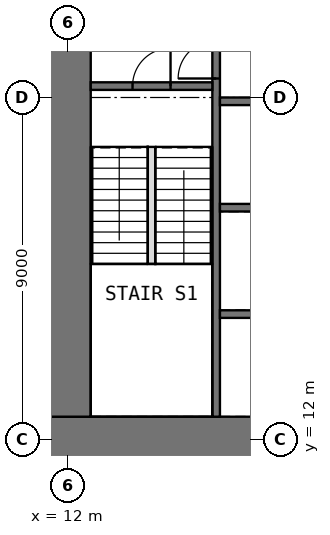
"""IFC4 building model, lengths in metres.
Left out: names, types, materials, properties, quantities, classifications, styles, units other than length and angle.
Written with IfcOpenShell. Run it as: python <this file> out.ifc"""

import sys

from ifc_helpers import new_model, si_unit, direction, frame, frame_2d, origin, place, context, subcontext, project, spatial, rectangle, extrude, element, fill, save


model = new_model("IFC4")
c1 = context("Model", 3, precision=1e-05, world=origin(), true_north=direction((0.0, 1.0)))
c2 = subcontext(c1, "Body", "Model", "MODEL_VIEW")
j1 = project(units=[si_unit("LENGTHUNIT", "METRE"), si_unit("PLANEANGLEUNIT", "RADIAN")], contexts=[c1])
p1 = place(None, origin())
s1 = spatial("IfcSite", under=j1, at=p1, CompositionType="ELEMENT")
p2 = place(p1, origin())
s2 = spatial("IfcBuilding", under=s1, at=p2, CompositionType="ELEMENT")
p3 = place(p2, frame((0.0, 0.0, 26.5)))
s3 = spatial("IfcBuildingStorey", under=s2, at=p3, CompositionType="ELEMENT", Elevation=26.5)
p4 = place(p3, frame((10.8, 11.7, -0.05), z_axis=(0.0, 0.0, 1.0), x_axis=(1.0, 0.0, 0.0)))
e1 = element("IfcWall", 1, at=p4, inside=s3, PredefinedType="SHEAR", context=c2, shape_type="SweptSolid", body=[
    extrude(rectangle(XDim=20.4, YDim=1.8, at=frame_2d((10.2, 0.0))), origin(), (0.0, 0.0, 1.0), 4.0),
])
p5 = place(p4, frame((9.2, 0.0, 0.05)))
e2 = element("IfcOpeningElement", 2, at=p5, cuts=e1, PredefinedType="OPENING", context=c2, shape_type="SweptSolid", body=[
    extrude(rectangle(XDim=2.0, YDim=2.2, at=frame_2d((1.0, 1.1))), frame((0.0, 0.91, 0.0), z_axis=(0.0, -1.0, 0.0), x_axis=(1.0, 0.0, 0.0)), (0.0, 0.0, 1.0), 1.82),
])
p6 = place(p3, frame((11.7, 12.6, -0.05), z_axis=(0.0, 0.0, 1.0), x_axis=(0.0, 1.0, 0.0)))
e3 = element("IfcWall", 3, at=p6, inside=s3, PredefinedType="SHEAR", context=c2, shape_type="SweptSolid", body=[
    extrude(rectangle(XDim=16.8, YDim=1.8, at=frame_2d((8.4, 0.0))), origin(), (0.0, 0.0, 1.0), 4.0),
])
p7 = place(p6, frame((9.9, 0.0, 0.05)))
e4 = element("IfcOpeningElement", 4, at=p7, cuts=e3, PredefinedType="OPENING", context=c2, shape_type="SweptSolid", body=[
    extrude(rectangle(XDim=1.0, YDim=2.2, at=frame_2d((0.5, 1.1))), frame((0.0, 0.91, 0.0), z_axis=(0.0, -1.0, 0.0), x_axis=(1.0, 0.0, 0.0)), (0.0, 0.0, 1.0), 1.82),
])
p8 = place(p3, frame((15.9, 12.6, -0.05), z_axis=(0.0, 0.0, 1.0), x_axis=(0.0, 1.0, 0.0)))
e5 = element("IfcWall", 5, at=p8, inside=s3, PredefinedType="SHEAR", context=c2, shape_type="SweptSolid", body=[
    extrude(rectangle(XDim=16.8, YDim=0.2, at=frame_2d((8.4, 0.0))), origin(), (0.0, 0.0, 1.0), 4.0),
])
p9 = place(p8, frame((8.9, 0.0, 0.05)))
e6 = element("IfcOpeningElement", 6, at=p9, cuts=e5, PredefinedType="OPENING", context=c2, shape_type="SweptSolid", body=[
    extrude(rectangle(XDim=1.0, YDim=2.2, at=frame_2d((0.5, 1.1))), frame((0.0, 0.11, 0.0), z_axis=(0.0, -1.0, 0.0), x_axis=(1.0, 0.0, 0.0)), (0.0, 0.0, 1.0), 0.22),
])
p10 = place(p3, frame((12.6, 21.3, -0.05), z_axis=(0.0, 0.0, 1.0), x_axis=(1.0, 0.0, 0.0)))
e7 = element("IfcWall", 7, at=p10, inside=s3, PredefinedType="SHEAR", context=c2, shape_type="SweptSolid", body=[
    extrude(rectangle(XDim=3.2, YDim=0.2, at=frame_2d((1.6, 0.0))), origin(), (0.0, 0.0, 1.0), 4.0),
])
p11 = place(p10, frame((1.1, 0.0, 0.05)))
e8 = element("IfcOpeningElement", 8, at=p11, cuts=e7, PredefinedType="OPENING", context=c2, shape_type="SweptSolid", body=[
    extrude(rectangle(XDim=1.0, YDim=2.2, at=frame_2d((0.5, 1.1))), frame((0.0, 0.11, 0.0), z_axis=(0.0, -1.0, 0.0), x_axis=(1.0, 0.0, 0.0)), (0.0, 0.0, 1.0), 0.22),
])
for number, where, z_axis, x_axis in (
    (9, (16.0, 15.3, -0.05), (0.0, 0.0, 1.0), (1.0, 0.0, 0.0)),
    (10, (16.0, 18.1, -0.05), (0.0, 0.0, 1.0), (1.0, 0.0, 0.0)),
    (11, (16.0, 20.9, -0.05), (0.0, 0.0, 1.0), (1.0, 0.0, 0.0)),
):
    element("IfcWall", number, at=place(p3, frame(where, z_axis=z_axis, x_axis=x_axis)), inside=s3, PredefinedType="SHEAR", context=c2, shape_type="SweptSolid", body=[
        extrude(rectangle(XDim=3.2, YDim=0.2, at=frame_2d((1.6, 0.0))), origin(), (0.0, 0.0, 1.0), 4.0),
    ])
p12 = place(p3, frame((14.2, 16.62, 0.0), z_axis=(0.0, 0.0, 1.0), x_axis=(0.0, 1.0, 0.0)))
e12 = element("IfcWall", 12, at=p12, inside=s3, PredefinedType="PARTITIONING", context=c2, shape_type="SweptSolid", body=[
    extrude(rectangle(XDim=3.08, YDim=0.2, at=frame_2d((1.54, 0.0))), origin(), (0.0, 0.0, 1.0), 4.0),
])
p13 = place(p11, origin())
e13 = element("IfcDoor", 13, at=p13, inside=s3, OperationType="SINGLE_SWING_RIGHT", PredefinedType="DOOR", context=c2, shape_type="SweptSolid", body=[
    extrude(rectangle(XDim=1.0, YDim=2.2, at=frame_2d((0.5, 1.1))), frame((0.0, 0.025, 0.0), z_axis=(0.0, -1.0, 0.0), x_axis=(1.0, 0.0, 0.0)), (0.0, 0.0, 1.0), 0.05),
])
fill(e8, e13)
p14 = place(p9, origin())
e14 = element("IfcDoor", 14, at=p14, inside=s3, OperationType="SINGLE_SWING_LEFT", PredefinedType="DOOR", context=c2, shape_type="SweptSolid", body=[
    extrude(rectangle(XDim=1.0, YDim=2.2, at=frame_2d((0.5, 1.1))), frame((0.0, 0.025, 0.0), z_axis=(0.0, -1.0, 0.0), x_axis=(1.0, 0.0, 0.0)), (0.0, 0.0, 1.0), 0.05),
])
fill(e6, e14)
save(model, sys.argv[1])
